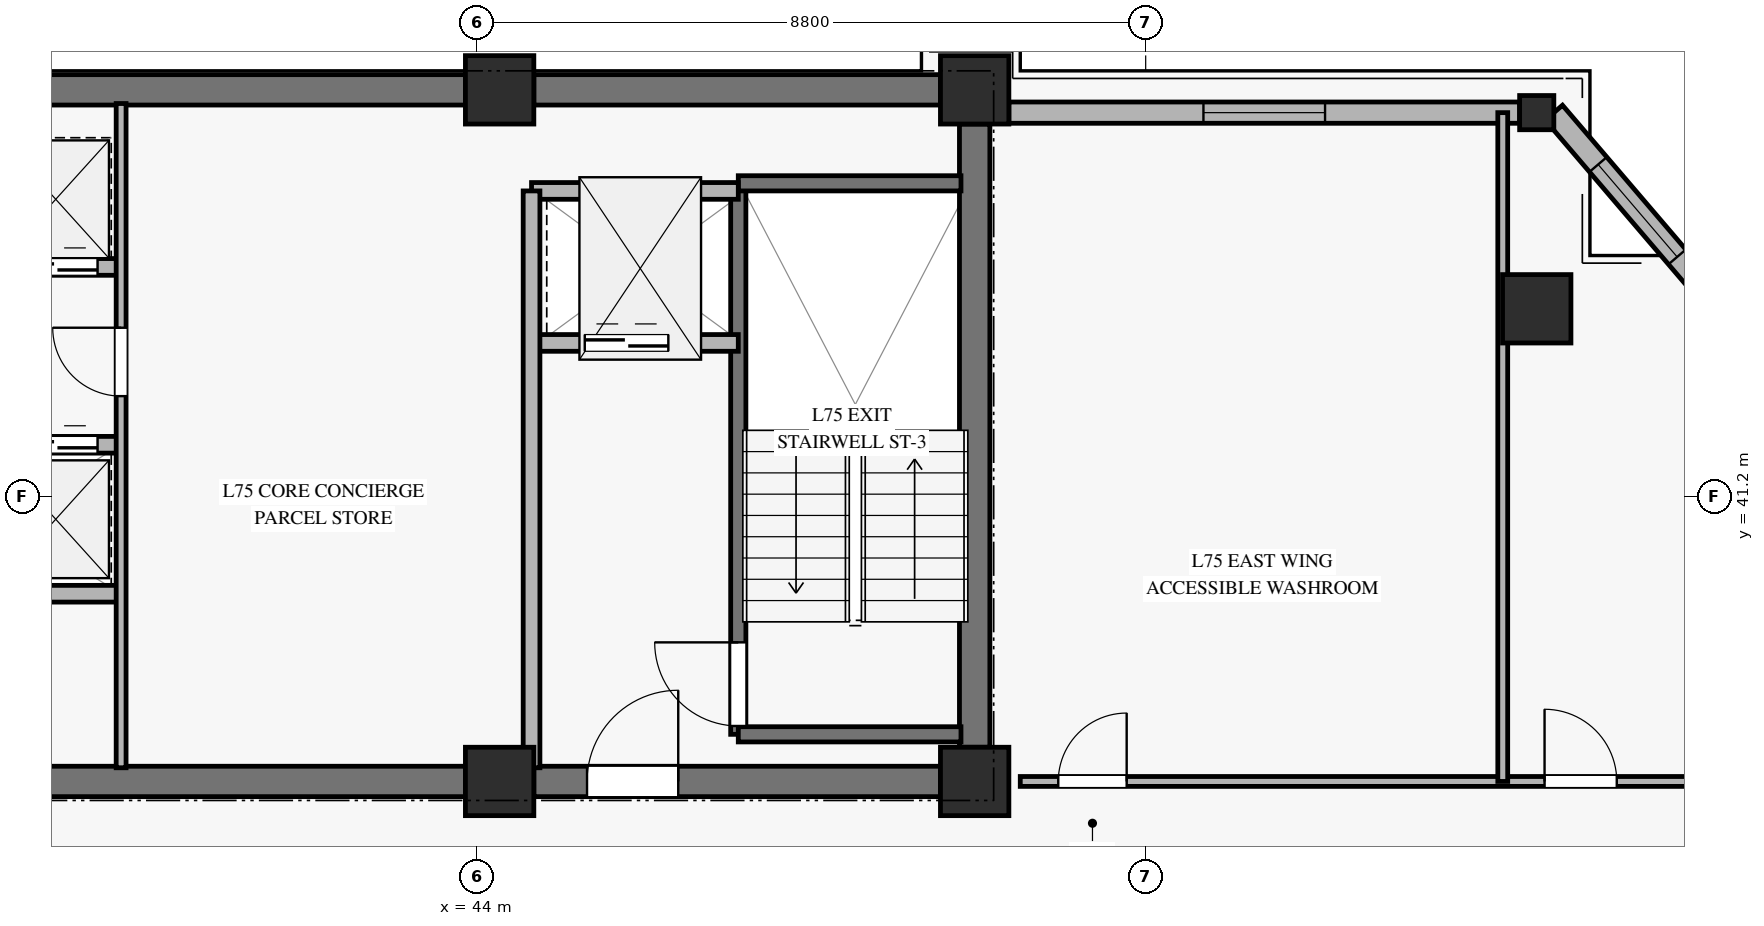
"""IFC4 building model, lengths in metres.
Left out: names, types, materials, properties, quantities, classifications, styles, units other than length and angle.
Written with IfcOpenShell. Run it as: python <this file> out.ifc"""

import sys

from ifc_helpers import new_model, si_unit, direction, frame, frame_2d, origin, origin_2d, place, context, subcontext, project, spatial, rectangle, hollow_rectangle, extrude, source, transform, mapped, element, fill, save


model = new_model("IFC4")
c1 = context("Model", 3, precision=1e-05, world=origin(), true_north=direction((0.0, 1.0)))
c2 = subcontext(c1, "Body", "Model", "MODEL_VIEW")
j1 = project(units=[si_unit("LENGTHUNIT", "METRE"), si_unit("PLANEANGLEUNIT", "RADIAN")], contexts=[c1])
p1 = place(None, origin())
s1 = spatial("IfcSite", under=j1, at=p1, CompositionType="ELEMENT")
p2 = place(p1, origin())
s2 = spatial("IfcBuilding", under=s1, at=p2, CompositionType="ELEMENT")
p3 = place(p2, frame((0.0, 0.0, 293.8)))
s3 = spatial("IfcBuildingStorey", under=s2, at=p3, CompositionType="ELEMENT", Elevation=293.8)
m1 = source(origin(), c2, "Body", "SweptSolid", [
    extrude(rectangle(XDim=0.9, YDim=0.9, at=origin_2d()), origin(), (0.0, 0.0, 1.0), 3.185),
])
for number, where, z_axis, x_axis in (
    (1, (44.3, 37.45, 0.0), (0.0, 0.0, 1.0), (1.0, 0.0, 0.0)),
    (2, (44.3, 46.55, 0.0), (0.0, 0.0, 1.0), (1.0, 0.0, 0.0)),
    (3, (50.55, 37.45, 0.0), (0.0, 0.0, 1.0), (1.0, 0.0, 0.0)),
    (4, (50.55, 46.55, 0.0), (0.0, 0.0, 1.0), (1.0, 0.0, 0.0)),
):
    element("IfcColumn", number, at=place(p3, frame(where, z_axis=z_axis, x_axis=x_axis)), inside=s3, PredefinedType="PILASTER", context=c2, shape_type="MappedRepresentation", body=[
        mapped(m1, transform((0.0, 0.0, 0.0), x_axis=(1.0, 0.0, 0.0), y_axis=(0.0, 1.0, 0.0), z_axis=(0.0, 0.0, 1.0), scale=1.0)),
    ])
p4 = place(p3, frame((36.05, 46.55, 0.0), z_axis=(0.0, 0.0, 1.0), x_axis=(1.0, 0.0, 0.0)))
e5 = element("IfcWall", 5, at=p4, inside=s3, PredefinedType="SHEAR", context=c2, shape_type="SweptSolid", body=[
    extrude(rectangle(XDim=7.8, YDim=0.4, at=frame_2d((3.9, 0.0))), origin(), (0.0, 0.0, 1.0), 3.185),
])
p5 = place(p3, frame((44.75, 46.55, 0.0), z_axis=(0.0, 0.0, 1.0), x_axis=(1.0, 0.0, 0.0)))
e6 = element("IfcWall", 6, at=p5, inside=s3, PredefinedType="SHEAR", context=c2, shape_type="SweptSolid", body=[
    extrude(rectangle(XDim=5.35, YDim=0.4, at=frame_2d((2.675, 0.0))), origin(), (0.0, 0.0, 1.0), 3.185),
])
p6 = place(p3, frame((36.05, 37.45, 0.0), z_axis=(0.0, 0.0, 1.0), x_axis=(1.0, 0.0, 0.0)))
e7 = element("IfcWall", 7, at=p6, inside=s3, PredefinedType="SHEAR", context=c2, shape_type="SweptSolid", body=[
    extrude(rectangle(XDim=7.8, YDim=0.4, at=frame_2d((3.9, 0.0))), origin(), (0.0, 0.0, 1.0), 3.185),
])
p7 = place(p3, frame((44.75, 37.45, 0.0), z_axis=(0.0, 0.0, 1.0), x_axis=(1.0, 0.0, 0.0)))
e8 = element("IfcWall", 8, at=p7, inside=s3, PredefinedType="SHEAR", context=c2, shape_type="SweptSolid", body=[
    extrude(rectangle(XDim=5.35, YDim=0.4, at=frame_2d((2.675, 0.0))), origin(), (0.0, 0.0, 1.0), 3.185),
])
p8 = place(p7, frame((0.7, 0.0, 0.0)))
e9 = element("IfcOpeningElement", 9, at=p8, cuts=e8, PredefinedType="OPENING", context=c2, shape_type="SweptSolid", body=[
    extrude(rectangle(XDim=1.2, YDim=2.15, at=frame_2d((0.6, 1.075))), frame((0.0, 0.21, 0.0), z_axis=(0.0, -1.0, 0.0), x_axis=(1.0, 0.0, 0.0)), (0.0, 0.0, 1.0), 0.42),
])
p9 = place(p3, frame((50.55, 37.9, 0.0), z_axis=(0.0, 0.0, 1.0), x_axis=(0.0, 1.0, 0.0)))
e10 = element("IfcWall", 10, at=p9, inside=s3, PredefinedType="SHEAR", context=c2, shape_type="SweptSolid", body=[
    extrude(rectangle(XDim=8.2, YDim=0.4, at=frame_2d((4.1, 0.0))), origin(), (0.0, 0.0, 1.0), 3.185),
])
m2 = source(origin(), c2, "Body", "SweptSolid", [
    extrude(hollow_rectangle(XDim=0.9, YDim=0.9, WallThickness=0.04, at=origin_2d()), origin(), (0.0, 0.0, 1.0), 3.185),
])
p10 = place(p3, frame((57.945, 43.669, 0.0), z_axis=(0.0, 0.0, 1.0), x_axis=(1.0, 0.0, 0.0)))
e11 = element("IfcColumn", 11, at=p10, inside=s3, PredefinedType="COLUMN", context=c2, shape_type="MappedRepresentation", body=[
    mapped(m2, transform((0.0, 0.0, 0.0), x_axis=(1.0, 0.0, 0.0), y_axis=(0.0, 1.0, 0.0), z_axis=(0.0, 0.0, 1.0), scale=1.0)),
])
m3 = source(origin(), c2, "Body", "SweptSolid", [
    extrude(hollow_rectangle(XDim=0.45, YDim=0.45, WallThickness=0.022, at=origin_2d()), origin(), (0.0, 0.0, 1.0), 3.185),
])
p11 = place(p3, frame((57.945, 46.25, 0.0), z_axis=(0.0, 0.0, 1.0), x_axis=(1.0, 0.0, 0.0)))
e12 = element("IfcColumn", 12, at=p11, inside=s3, PredefinedType="COLUMN", context=c2, shape_type="MappedRepresentation", body=[
    mapped(m3, transform((0.0, 0.0, 0.0), x_axis=(1.0, 0.0, 0.0), y_axis=(0.0, 1.0, 0.0), z_axis=(0.0, 0.0, 1.0), scale=1.0)),
])
p12 = place(p3, frame((51.0, 46.25, 0.0), z_axis=(0.0, 0.0, 1.0), x_axis=(1.0, 0.0, 0.0)))
e13 = element("IfcWall", 13, at=p12, inside=s3, PredefinedType="SOLIDWALL", context=c2, shape_type="SweptSolid", body=[
    extrude(rectangle(XDim=6.72, YDim=0.28, at=frame_2d((3.36, 0.0))), origin(), (0.0, 0.0, 1.0), 2.815),
])
p13 = place(p12, frame((2.56, 0.0, 0.45)))
e14 = element("IfcOpeningElement", 14, at=p13, cuts=e13, PredefinedType="OPENING", context=c2, shape_type="SweptSolid", body=[
    extrude(rectangle(XDim=1.6, YDim=2.0, at=frame_2d((0.8, 1.0))), frame((0.0, 0.15, 0.0), z_axis=(0.0, -1.0, 0.0), x_axis=(1.0, 0.0, 0.0)), (0.0, 0.0, 1.0), 0.3),
])
p14 = place(p3, frame((60.376, 43.669, 0.0), z_axis=(0.0, 0.0, 1.0), x_axis=(-0.649724860602, 0.76016945842, 0.0)))
e15 = element("IfcWall", 15, at=p14, inside=s3, PredefinedType="SOLIDWALL", context=c2, shape_type="SweptSolid", body=[
    extrude(rectangle(XDim=3.395, YDim=0.3, at=frame_2d((1.698, 0.0))), origin(), (0.0, 0.0, 1.0), 2.815),
])
p15 = place(p14, frame((0.898, 0.0, 0.45)))
e16 = element("IfcOpeningElement", 16, at=p15, cuts=e15, PredefinedType="OPENING", context=c2, shape_type="SweptSolid", body=[
    extrude(rectangle(XDim=1.6, YDim=2.0, at=frame_2d((0.8, 1.0))), frame((0.0, 0.16, 0.0), z_axis=(0.0, -1.0, 0.0), x_axis=(1.0, 0.0, 0.0)), (0.0, 0.0, 1.0), 0.32),
])
p16 = place(p3, frame((47.44, 38.07, 0.0), z_axis=(0.0, 0.0, 1.0), x_axis=(0.0, 1.0, 0.0)))
e17 = element("IfcWall", 17, at=p16, inside=s3, PredefinedType="SOLIDWALL", context=c2, shape_type="SweptSolid", body=[
    extrude(rectangle(XDim=7.25, YDim=0.2, at=frame_2d((3.625, 0.0))), origin(), (0.0, 0.0, 1.0), 3.4),
])
p17 = place(p16, frame((0.11, 0.0, 0.0)))
e18 = element("IfcOpeningElement", 18, at=p17, cuts=e17, PredefinedType="OPENING", context=c2, shape_type="SweptSolid", body=[
    extrude(rectangle(XDim=1.1, YDim=2.15, at=frame_2d((0.55, 1.075))), frame((0.0, 0.11, 0.0), z_axis=(0.0, -1.0, 0.0), x_axis=(1.0, 0.0, 0.0)), (0.0, 0.0, 1.0), 0.22),
])
for number, where, z_axis, x_axis in (
    (19, (47.44, 45.32, 0.0), (0.0, 0.0, 1.0), (1.0, 0.0, 0.0)),
    (20, (47.44, 38.07, 0.0), (0.0, 0.0, 1.0), (1.0, 0.0, 0.0)),
):
    element("IfcWall", number, at=place(p3, frame(where, z_axis=z_axis, x_axis=x_axis)), inside=s3, PredefinedType="SOLIDWALL", context=c2, shape_type="SweptSolid", body=[
        extrude(rectangle(XDim=2.93, YDim=0.2, at=frame_2d((1.465, 0.0))), origin(), (0.0, 0.0, 1.0), 3.4),
    ])
p18 = place(p3, frame((44.72, 43.22, 0.0), z_axis=(0.0, 0.0, 1.0), x_axis=(1.0, 0.0, 0.0)))
e21 = element("IfcWall", 21, at=p18, inside=s3, PredefinedType="SOLIDWALL", context=c2, shape_type="SweptSolid", body=[
    extrude(rectangle(XDim=2.72, YDim=0.22, at=frame_2d((1.36, 0.0))), origin(), (0.0, 0.0, 1.0), 3.185),
])
p19 = place(p18, frame((0.7, 0.0, 0.0)))
e22 = element("IfcOpeningElement", 22, at=p19, cuts=e21, PredefinedType="OPENING", context=c2, shape_type="SweptSolid", body=[
    extrude(rectangle(XDim=1.1, YDim=2.2, at=frame_2d((0.55, 1.1))), frame((0.0, 0.12, 0.0), z_axis=(0.0, -1.0, 0.0), x_axis=(1.0, 0.0, 0.0)), (0.0, 0.0, 1.0), 0.24),
])
p20 = place(p3, frame((44.72, 45.22, 0.0), z_axis=(0.0, 0.0, 1.0), x_axis=(1.0, 0.0, 0.0)))
e23 = element("IfcWall", 23, at=p20, inside=s3, PredefinedType="SOLIDWALL", context=c2, shape_type="SweptSolid", body=[
    extrude(rectangle(XDim=2.72, YDim=0.22, at=frame_2d((1.36, 0.0))), origin(), (0.0, 0.0, 1.0), 3.185),
])
p21 = place(p3, frame((44.72, 37.63, 0.0), z_axis=(0.0, 0.0, 1.0), x_axis=(0.0, 1.0, 0.0)))
e24 = element("IfcWall", 24, at=p21, inside=s3, PredefinedType="SOLIDWALL", context=c2, shape_type="SweptSolid", body=[
    extrude(rectangle(XDim=7.59, YDim=0.22, at=frame_2d((3.795, 0.0))), origin(), (0.0, 0.0, 1.0), 3.185),
])
p22 = place(p3, frame((36.12, 44.22, 0.0), z_axis=(0.0, 0.0, 1.0), x_axis=(1.0, 0.0, 0.0)))
e25 = element("IfcWall", 25, at=p22, inside=s3, PredefinedType="SOLIDWALL", context=c2, shape_type="SweptSolid", body=[
    extrude(rectangle(XDim=3.2, YDim=0.22, at=frame_2d((1.6, 0.0))), origin(), (0.0, 0.0, 1.0), 3.185),
])
p23 = place(p22, frame((0.3, 0.0, 0.0)))
e26 = element("IfcOpeningElement", 26, at=p23, cuts=e25, PredefinedType="OPENING", context=c2, shape_type="SweptSolid", body=[
    extrude(rectangle(XDim=1.1, YDim=2.2, at=frame_2d((0.55, 1.1))), frame((0.0, 0.12, 0.0), z_axis=(0.0, -1.0, 0.0), x_axis=(1.0, 0.0, 0.0)), (0.0, 0.0, 1.0), 0.24),
])
p24 = place(p22, frame((1.79, 0.0, 0.0)))
e27 = element("IfcOpeningElement", 27, at=p24, cuts=e25, PredefinedType="OPENING", context=c2, shape_type="SweptSolid", body=[
    extrude(rectangle(XDim=1.1, YDim=2.2, at=frame_2d((0.55, 1.1))), frame((0.0, 0.12, 0.0), z_axis=(0.0, -1.0, 0.0), x_axis=(1.0, 0.0, 0.0)), (0.0, 0.0, 1.0), 0.24),
])
p25 = place(p3, frame((36.12, 41.88, 0.0), z_axis=(0.0, 0.0, 1.0), x_axis=(1.0, 0.0, 0.0)))
e28 = element("IfcWall", 28, at=p25, inside=s3, PredefinedType="SOLIDWALL", context=c2, shape_type="SweptSolid", body=[
    extrude(rectangle(XDim=3.2, YDim=0.22, at=frame_2d((1.6, 0.0))), origin(), (0.0, 0.0, 1.0), 3.185),
])
p26 = place(p25, frame((0.3, 0.0, 0.0)))
e29 = element("IfcOpeningElement", 29, at=p26, cuts=e28, PredefinedType="OPENING", context=c2, shape_type="SweptSolid", body=[
    extrude(rectangle(XDim=1.1, YDim=2.2, at=frame_2d((0.55, 1.1))), frame((0.0, 0.12, 0.0), z_axis=(0.0, -1.0, 0.0), x_axis=(1.0, 0.0, 0.0)), (0.0, 0.0, 1.0), 0.24),
])
p27 = place(p25, frame((1.79, 0.0, 0.0)))
e30 = element("IfcOpeningElement", 30, at=p27, cuts=e28, PredefinedType="OPENING", context=c2, shape_type="SweptSolid", body=[
    extrude(rectangle(XDim=1.1, YDim=2.2, at=frame_2d((0.55, 1.1))), frame((0.0, 0.12, 0.0), z_axis=(0.0, -1.0, 0.0), x_axis=(1.0, 0.0, 0.0)), (0.0, 0.0, 1.0), 0.24),
])
p28 = place(p3, frame((36.12, 39.92, 0.0), z_axis=(0.0, 0.0, 1.0), x_axis=(1.0, 0.0, 0.0)))
e31 = element("IfcWall", 31, at=p28, inside=s3, PredefinedType="SOLIDWALL", context=c2, shape_type="SweptSolid", body=[
    extrude(rectangle(XDim=3.2, YDim=0.22, at=frame_2d((1.6, 0.0))), origin(), (0.0, 0.0, 1.0), 3.185),
])
p29 = place(p3, frame((39.32, 37.63, 0.0), z_axis=(0.0, 0.0, 1.0), x_axis=(0.0, 1.0, 0.0)))
e32 = element("IfcWall", 32, at=p29, inside=s3, PredefinedType="PARTITIONING", context=c2, shape_type="SweptSolid", body=[
    extrude(rectangle(XDim=8.74, YDim=0.13, at=frame_2d((4.37, 0.0))), origin(), (0.0, 0.0, 1.0), 3.185),
])
p30 = place(p29, frame((4.89, 0.0, 0.0)))
e33 = element("IfcOpeningElement", 33, at=p30, cuts=e32, PredefinedType="OPENING", context=c2, shape_type="SweptSolid", body=[
    extrude(rectangle(XDim=0.9, YDim=2.1, at=frame_2d((0.45, 1.05))), frame((0.0, 0.075, 0.0), z_axis=(0.0, -1.0, 0.0), x_axis=(1.0, 0.0, 0.0)), (0.0, 0.0, 1.0), 0.15),
])
p31 = place(p3, frame((51.15, 37.45, 0.0), z_axis=(0.0, 0.0, 1.0), x_axis=(1.0, 0.0, 0.0)))
e34 = element("IfcWall", 34, at=p31, inside=s3, PredefinedType="PARTITIONING", context=c2, shape_type="SweptSolid", body=[
    extrude(rectangle(XDim=9.226, YDim=0.13, at=frame_2d((4.613, 0.0))), origin(), (0.0, 0.0, 1.0), 2.82),
])
p32 = place(p31, frame((0.5, 0.0, 0.0)))
e35 = element("IfcOpeningElement", 35, at=p32, cuts=e34, PredefinedType="OPENING", context=c2, shape_type="SweptSolid", body=[
    extrude(rectangle(XDim=0.9, YDim=2.1, at=frame_2d((0.45, 1.05))), frame((0.0, 0.075, 0.0), z_axis=(0.0, -1.0, 0.0), x_axis=(1.0, 0.0, 0.0)), (0.0, 0.0, 1.0), 0.15),
])
p33 = place(p31, frame((6.898, 0.0, 0.0)))
e36 = element("IfcOpeningElement", 36, at=p33, cuts=e34, PredefinedType="OPENING", context=c2, shape_type="SweptSolid", body=[
    extrude(rectangle(XDim=0.95, YDim=2.1, at=frame_2d((0.475, 1.05))), frame((0.0, 0.075, 0.0), z_axis=(0.0, -1.0, 0.0), x_axis=(1.0, 0.0, 0.0)), (0.0, 0.0, 1.0), 0.15),
])
p34 = place(p3, frame((57.498, 37.45, 0.0), z_axis=(0.0, 0.0, 1.0), x_axis=(0.0, 1.0, 0.0)))
e37 = element("IfcWall", 37, at=p34, inside=s3, PredefinedType="PARTITIONING", context=c2, shape_type="SweptSolid", body=[
    extrude(rectangle(XDim=8.8, YDim=0.13, at=frame_2d((4.4, 0.0))), origin(), (0.0, 0.0, 1.0), 2.82),
])
m4 = source(origin(), c2, "Body", "SweptSolid", [
    extrude(rectangle(XDim=1.6, YDim=2.0, at=frame_2d((0.8, 1.0))), frame((0.0, 0.03, 0.0), z_axis=(0.0, -1.0, 0.0), x_axis=(1.0, 0.0, 0.0)), (0.0, 0.0, 1.0), 0.06),
])
p35 = place(p13, origin())
e38 = element("IfcWindow", 38, at=p35, inside=s3, PartitioningType="SINGLE_PANEL", PredefinedType="WINDOW", context=c2, shape_type="MappedRepresentation", body=[
    mapped(m4, transform((0.0, 0.0, 0.0), x_axis=(1.0, 0.0, 0.0), y_axis=(0.0, 1.0, 0.0), z_axis=(0.0, 0.0, 1.0), scale=1.0)),
])
fill(e14, e38)
p36 = place(p15, origin())
e39 = element("IfcWindow", 39, at=p36, inside=s3, PartitioningType="SINGLE_PANEL", PredefinedType="WINDOW", context=c2, shape_type="MappedRepresentation", body=[
    mapped(m4, transform((0.0, 0.0, 0.0), x_axis=(1.0, 0.0, 0.0), y_axis=(0.0, 1.0, 0.0), z_axis=(0.0, 0.0, 1.0), scale=1.0)),
])
fill(e16, e39)
m5 = source(origin(), c2, "Body", "SweptSolid", [
    extrude(rectangle(XDim=1.1, YDim=2.15, at=frame_2d((0.55, 1.075))), frame((0.0, 0.025, 0.0), z_axis=(0.0, -1.0, 0.0), x_axis=(1.0, 0.0, 0.0)), (0.0, 0.0, 1.0), 0.05),
])
p37 = place(p17, origin())
e40 = element("IfcDoor", 40, at=p37, inside=s3, OperationType="SINGLE_SWING_RIGHT", PredefinedType="DOOR", context=c2, shape_type="MappedRepresentation", body=[
    mapped(m5, transform((0.0, 0.0, 0.0), x_axis=(1.0, 0.0, 0.0), y_axis=(0.0, 1.0, 0.0), z_axis=(0.0, 0.0, 1.0), scale=1.0)),
])
fill(e18, e40)
m6 = source(origin(), c2, "Body", "SweptSolid", [
    extrude(rectangle(XDim=1.1, YDim=2.2, at=frame_2d((0.55, 1.1))), frame((0.0, 0.025, 0.0), z_axis=(0.0, -1.0, 0.0), x_axis=(1.0, 0.0, 0.0)), (0.0, 0.0, 1.0), 0.05),
])
p38 = place(p19, origin())
e41 = element("IfcDoor", 41, at=p38, inside=s3, OperationType="SLIDING_TO_LEFT", PredefinedType="DOOR", context=c2, shape_type="MappedRepresentation", body=[
    mapped(m6, transform((0.0, 0.0, 0.0), x_axis=(1.0, 0.0, 0.0), y_axis=(0.0, 1.0, 0.0), z_axis=(0.0, 0.0, 1.0), scale=1.0)),
])
fill(e22, e41)
m7 = source(origin(), c2, "Body", "SweptSolid", [
    extrude(rectangle(XDim=1.2, YDim=2.15, at=frame_2d((0.6, 1.075))), frame((0.0, 0.025, 0.0), z_axis=(0.0, -1.0, 0.0), x_axis=(1.0, 0.0, 0.0)), (0.0, 0.0, 1.0), 0.05),
])
p39 = place(p8, origin())
e42 = element("IfcDoor", 42, at=p39, inside=s3, OperationType="SINGLE_SWING_RIGHT", PredefinedType="DOOR", context=c2, shape_type="MappedRepresentation", body=[
    mapped(m7, transform((0.0, 0.0, 0.0), x_axis=(1.0, 0.0, 0.0), y_axis=(0.0, 1.0, 0.0), z_axis=(0.0, 0.0, 1.0), scale=1.0)),
])
fill(e9, e42)
p40 = place(p24, origin())
e43 = element("IfcDoor", 43, at=p40, inside=s3, OperationType="SLIDING_TO_LEFT", PredefinedType="DOOR", context=c2, shape_type="MappedRepresentation", body=[
    mapped(m6, transform((0.0, 0.0, 0.0), x_axis=(1.0, 0.0, 0.0), y_axis=(0.0, 1.0, 0.0), z_axis=(0.0, 0.0, 1.0), scale=1.0)),
])
fill(e27, e43)
p41 = place(p27, origin())
e44 = element("IfcDoor", 44, at=p41, inside=s3, OperationType="SLIDING_TO_LEFT", PredefinedType="DOOR", context=c2, shape_type="MappedRepresentation", body=[
    mapped(m6, transform((0.0, 0.0, 0.0), x_axis=(1.0, 0.0, 0.0), y_axis=(0.0, 1.0, 0.0), z_axis=(0.0, 0.0, 1.0), scale=1.0)),
])
fill(e30, e44)
m8 = source(origin(), c2, "Body", "SweptSolid", [
    extrude(rectangle(XDim=0.9, YDim=2.1, at=frame_2d((0.45, 1.05))), frame((0.0, 0.025, 0.0), z_axis=(0.0, -1.0, 0.0), x_axis=(1.0, 0.0, 0.0)), (0.0, 0.0, 1.0), 0.05),
])
p42 = place(p30, origin())
e45 = element("IfcDoor", 45, at=p42, inside=s3, OperationType="SINGLE_SWING_RIGHT", PredefinedType="DOOR", context=c2, shape_type="MappedRepresentation", body=[
    mapped(m8, transform((0.0, 0.0, 0.0), x_axis=(1.0, 0.0, 0.0), y_axis=(0.0, 1.0, 0.0), z_axis=(0.0, 0.0, 1.0), scale=1.0)),
])
fill(e33, e45)
p43 = place(p32, origin())
e46 = element("IfcDoor", 46, at=p43, inside=s3, OperationType="SINGLE_SWING_RIGHT", PredefinedType="DOOR", context=c2, shape_type="MappedRepresentation", body=[
    mapped(m8, transform((0.0, 0.0, 0.0), x_axis=(1.0, 0.0, 0.0), y_axis=(0.0, 1.0, 0.0), z_axis=(0.0, 0.0, 1.0), scale=1.0)),
])
fill(e35, e46)
m9 = source(origin(), c2, "Body", "SweptSolid", [
    extrude(rectangle(XDim=0.95, YDim=2.1, at=frame_2d((0.475, 1.05))), frame((0.0, 0.025, 0.0), z_axis=(0.0, -1.0, 0.0), x_axis=(1.0, 0.0, 0.0)), (0.0, 0.0, 1.0), 0.05),
])
p44 = place(p33, origin())
e47 = element("IfcDoor", 47, at=p44, inside=s3, OperationType="SINGLE_SWING_LEFT", PredefinedType="DOOR", context=c2, shape_type="MappedRepresentation", body=[
    mapped(m9, transform((0.0, 0.0, 0.0), x_axis=(1.0, 0.0, 0.0), y_axis=(0.0, 1.0, 0.0), z_axis=(0.0, 0.0, 1.0), scale=1.0)),
])
fill(e36, e47)
save(model, sys.argv[1])
